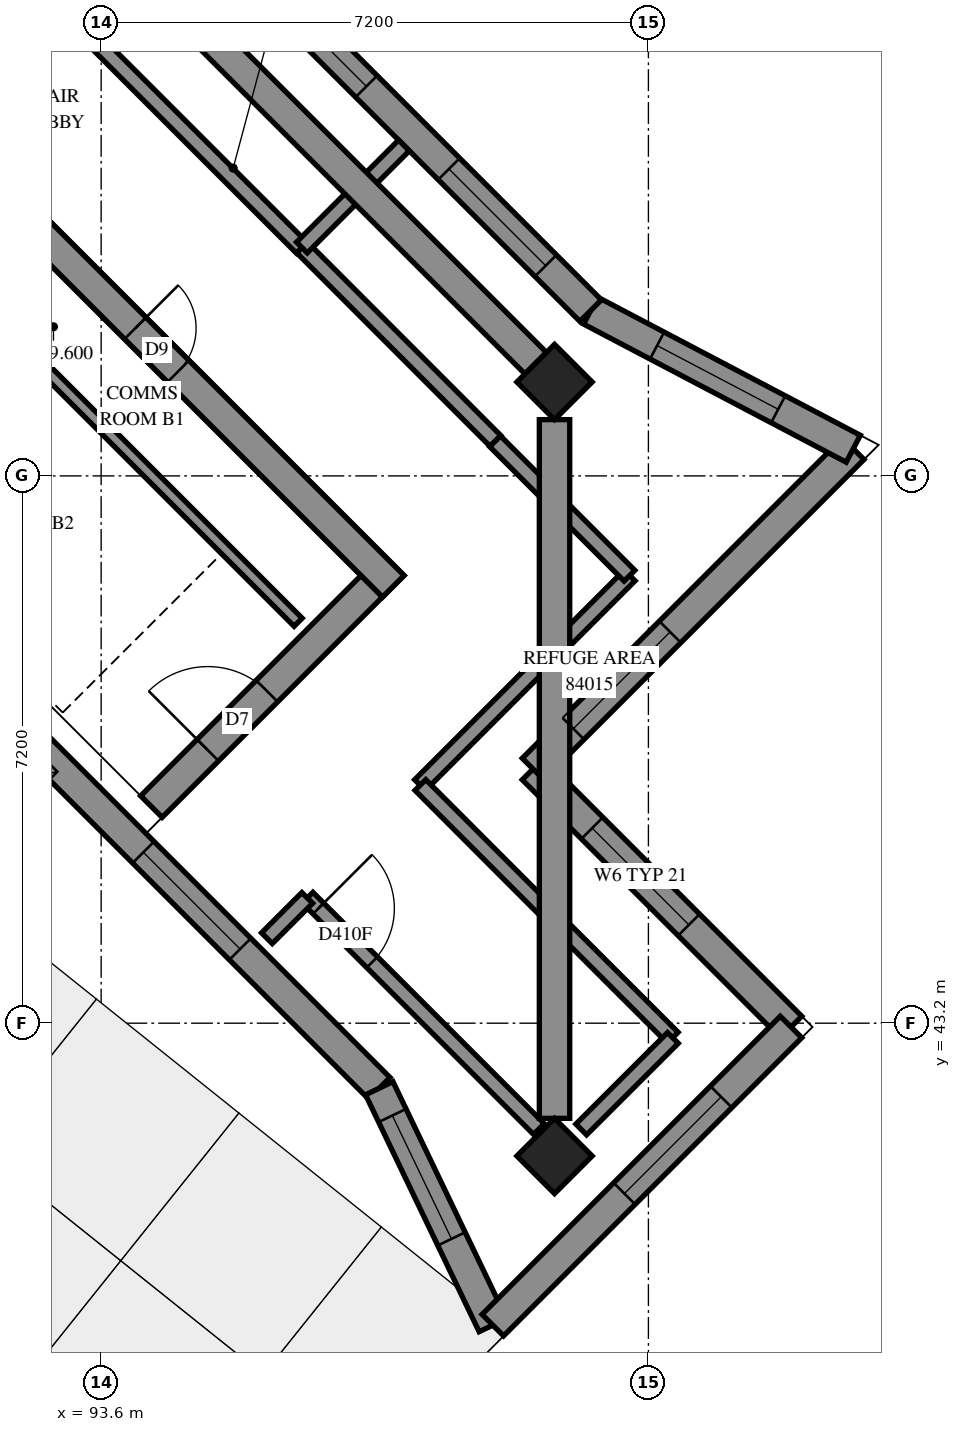
"""IFC4 building model, lengths in metres.
Left out: names, types, materials, properties, quantities, classifications, styles, units other than length and angle.
Written with IfcOpenShell. Run it as: python <this file> out.ifc"""

import sys

from ifc_helpers import new_model, si_unit, direction, frame, frame_2d, origin, origin_2d, place, context, subcontext, project, spatial, polyline, rectangle, outline, extrude, element, fill, save


model = new_model("IFC4")
c1 = context("Model", 3, precision=1e-05, world=origin(), true_north=direction((0.0, 1.0)))
c2 = subcontext(c1, "Body", "Model", "MODEL_VIEW")
j1 = project(units=[si_unit("LENGTHUNIT", "METRE"), si_unit("PLANEANGLEUNIT", "RADIAN")], contexts=[c1])
p1 = place(None, origin())
s1 = spatial("IfcSite", under=j1, at=p1, CompositionType="ELEMENT")
p2 = place(p1, origin())
s2 = spatial("IfcBuilding", under=s1, at=p2, CompositionType="ELEMENT")
p3 = place(p2, frame((0.0, 0.0, 309.6)))
s3 = spatial("IfcBuildingStorey", under=s2, at=p3, CompositionType="ELEMENT", Elevation=309.6)
for number, where, z_axis, x_axis in (
    (1, (99.565, 51.635, 0.0), (0.0, 0.0, 1.0), (0.707, -0.707, 0.0)),
    (2, (99.565, 41.453, 0.0), (0.0, 0.0, 1.0), (0.707, -0.707, 0.0)),
):
    element("IfcColumn", number, at=place(p3, frame(where, z_axis=z_axis, x_axis=x_axis)), inside=s3, PredefinedType="COLUMN", context=c2, shape_type="SweptSolid", body=[
        extrude(rectangle(XDim=0.7, YDim=0.7, at=origin_2d()), origin(), (0.0, 0.0, 1.0), 3.5),
    ])
p4 = place(p3, frame((86.695, 59.696, -0.3), z_axis=(0.0, 0.0, 1.0), x_axis=(0.7071100706, -0.7071034917, 0.0)))
e3 = element("IfcWall", 3, at=p4, inside=s3, PredefinedType="SHEAR", context=c2, shape_type="SweptSolid", body=[
    extrude(outline(polyline([(0.0, 0.0), (15.2, 0.0), (15.2, 3.1), (0.0, 3.1), (0.0, 0.0)])), frame((0.0, 0.2, 0.0), z_axis=(0.0, -1.0, 0.0), x_axis=(1.0, 0.0, 0.0)), (0.0, 0.0, 1.0), 0.4),
])
p5 = place(p4, frame((10.4, 0.0, 0.3)))
e4 = element("IfcOpeningElement", 4, at=p5, cuts=e3, PredefinedType="OPENING", context=c2, shape_type="SweptSolid", body=[
    extrude(rectangle(XDim=0.8, YDim=2.1, at=frame_2d((0.4, 1.05))), frame((0.0, 0.21, 0.0), z_axis=(0.0, -1.0, 0.0), x_axis=(1.0, 0.0, 0.0)), (0.0, 0.0, 1.0), 0.42),
])
p6 = place(p3, frame((94.261, 46.049, -0.3), z_axis=(0.0, 0.0, 1.0), x_axis=(0.7071067812, 0.7071067812, 0.0)))
e5 = element("IfcWall", 5, at=p6, inside=s3, PredefinedType="SHEAR", context=c2, shape_type="SweptSolid", body=[
    extrude(outline(polyline([(0.0, 0.0), (4.1, 0.0), (4.1, 3.1), (0.0, 3.1), (0.0, 0.0)])), frame((0.0, 0.2, 0.0), z_axis=(0.0, -1.0, 0.0), x_axis=(1.0, 0.0, 0.0)), (0.0, 0.0, 1.0), 0.4),
])
p7 = place(p6, frame((1.05, 0.0, 0.3)))
e6 = element("IfcOpeningElement", 6, at=p7, cuts=e5, PredefinedType="OPENING", context=c2, shape_type="SweptSolid", body=[
    extrude(rectangle(XDim=1.1, YDim=2.1, at=frame_2d((0.55, 1.05))), frame((0.0, 0.21, 0.0), z_axis=(0.0, -1.0, 0.0), x_axis=(1.0, 0.0, 0.0)), (0.0, 0.0, 1.0), 0.42),
])
p8 = place(p3, frame((102.676, 43.15, 0.0), z_axis=(0.0, 0.0, 1.0), x_axis=(-0.7070963646, 0.7071171977, 0.0)))
e7 = element("IfcWall", 7, at=p8, inside=s3, PredefinedType="SOLIDWALL", context=c2, shape_type="SweptSolid", body=[
    extrude(outline(polyline([(-0.2, -0.2), (4.6, -0.2), (5.0, 0.2), (0.2, 0.2), (-0.2, -0.2)])), origin(), (0.0, 0.0, 1.0), 3.5),
])
p9 = place(p8, frame((1.9, 0.0, 0.7)))
e8 = element("IfcOpeningElement", 8, at=p9, cuts=e7, PredefinedType="OPENING", context=c2, shape_type="SweptSolid", body=[
    extrude(rectangle(XDim=1.8, YDim=2.2, at=frame_2d((0.9, 1.1))), frame((0.0, 0.21, 0.0), z_axis=(0.0, -1.0, 0.0), x_axis=(1.0, 0.0, 0.0)), (0.0, 0.0, 1.0), 0.42),
])
p10 = place(p3, frame((99.282, 46.544, 0.0), z_axis=(0.0, 0.0, 1.0), x_axis=(0.7071067812, 0.7071067812, 0.0)))
e9 = element("IfcWall", 9, at=p10, inside=s3, PredefinedType="SOLIDWALL", context=c2, shape_type="SweptSolid", body=[
    extrude(outline(polyline([(0.2, -0.2), (6.23, -0.2), (5.687, 0.2), (-0.2, 0.2), (0.2, -0.2)])), origin(), (0.0, 0.0, 1.0), 3.5),
])
p11 = place(p10, frame((0.75, 0.0, 0.7)))
e10 = element("IfcOpeningElement", 10, at=p11, cuts=e9, PredefinedType="OPENING", context=c2, shape_type="SweptSolid", body=[
    extrude(rectangle(XDim=1.8, YDim=2.2, at=frame_2d((0.9, 1.1))), frame((0.0, 0.21, 0.0), z_axis=(0.0, -1.0, 0.0), x_axis=(1.0, 0.0, 0.0)), (0.0, 0.0, 1.0), 0.42),
])
p12 = place(p3, frame((103.495, 50.757, 0.0), z_axis=(0.0, 0.0, 1.0), x_axis=(-0.8850848595, 0.4654296848, 0.0)))
e11 = element("IfcWall", 11, at=p12, inside=s3, PredefinedType="SOLIDWALL", context=c2, shape_type="SweptSolid", body=[
    extrude(outline(polyline([(-0.272, -0.2), (3.873, -0.2), (3.934, 0.2), (0.272, 0.2), (-0.272, -0.2)])), origin(), (0.0, 0.0, 1.0), 3.5),
])
p13 = place(p12, frame((1.116, 0.0, 0.7)))
e12 = element("IfcOpeningElement", 12, at=p13, cuts=e11, PredefinedType="OPENING", context=c2, shape_type="SweptSolid", body=[
    extrude(rectangle(XDim=1.8, YDim=2.2, at=frame_2d((0.9, 1.1))), frame((0.0, 0.21, 0.0), z_axis=(0.0, -1.0, 0.0), x_axis=(1.0, 0.0, 0.0)), (0.0, 0.0, 1.0), 0.42),
])
p14 = place(p3, frame((100.04, 52.574, 0.0), z_axis=(0.0, 0.0, 1.0), x_axis=(-0.7071004896, 0.7071130728, 0.0)))
e13 = element("IfcWall", 13, at=p14, inside=s3, PredefinedType="SOLIDWALL", context=c2, shape_type="SweptSolid", body=[
    extrude(outline(polyline([(0.03, -0.2), (7.947, -0.2), (7.947, 0.2), (-0.03, 0.2), (0.03, -0.2)])), origin(), (0.0, 0.0, 1.0), 3.5),
])
p15 = place(p14, frame((0.836, 0.0, 0.7)))
e14 = element("IfcOpeningElement", 14, at=p15, cuts=e13, PredefinedType="OPENING", context=c2, shape_type="SweptSolid", body=[
    extrude(rectangle(XDim=1.8, YDim=2.2, at=frame_2d((0.9, 1.1))), frame((0.0, 0.21, 0.0), z_axis=(0.0, -1.0, 0.0), x_axis=(1.0, 0.0, 0.0)), (0.0, 0.0, 1.0), 0.42),
])
p16 = place(p14, frame((4.172, 0.0, 0.7)))
e15 = element("IfcOpeningElement", 15, at=p16, cuts=e13, PredefinedType="OPENING", context=c2, shape_type="SweptSolid", body=[
    extrude(rectangle(XDim=1.8, YDim=2.2, at=frame_2d((0.9, 1.1))), frame((0.0, 0.21, 0.0), z_axis=(0.0, -1.0, 0.0), x_axis=(1.0, 0.0, 0.0)), (0.0, 0.0, 1.0), 0.42),
])
p17 = place(p3, frame((92.292, 47.312, 0.0), z_axis=(0.0, 0.0, 1.0), x_axis=(0.707099663, -0.7071138993, 0.0)))
e16 = element("IfcWall", 16, at=p17, inside=s3, PredefinedType="SOLIDWALL", context=c2, shape_type="SweptSolid", body=[
    extrude(outline(polyline([(0.0, -0.2), (6.99, -0.2), (7.059, 0.2), (0.0, 0.2), (0.0, -0.2)])), origin(), (0.0, 0.0, 1.0), 3.5),
])
p18 = place(p17, frame((2.635, 0.0, 0.7)))
e17 = element("IfcOpeningElement", 17, at=p18, cuts=e16, PredefinedType="OPENING", context=c2, shape_type="SweptSolid", body=[
    extrude(rectangle(XDim=1.8, YDim=2.2, at=frame_2d((0.9, 1.1))), frame((0.0, 0.21, 0.0), z_axis=(0.0, -1.0, 0.0), x_axis=(1.0, 0.0, 0.0)), (0.0, 0.0, 1.0), 0.42),
])
p19 = place(p3, frame((97.259, 42.344, 0.0), z_axis=(0.0, 0.0, 1.0), x_axis=(0.432271135, -0.9017436808, 0.0)))
e18 = element("IfcWall", 18, at=p19, inside=s3, PredefinedType="SOLIDWALL", context=c2, shape_type="SweptSolid", body=[
    extrude(outline(polyline([(0.034, -0.2), (3.739, -0.2), (3.175, 0.2), (-0.034, 0.2), (0.034, -0.2)])), origin(), (0.0, 0.0, 1.0), 3.5),
])
p20 = place(p19, frame((0.398, 0.0, 0.7)))
e19 = element("IfcOpeningElement", 19, at=p20, cuts=e18, PredefinedType="OPENING", context=c2, shape_type="SweptSolid", body=[
    extrude(rectangle(XDim=1.8, YDim=2.2, at=frame_2d((0.9, 1.1))), frame((0.0, 0.21, 0.0), z_axis=(0.0, -1.0, 0.0), x_axis=(1.0, 0.0, 0.0)), (0.0, 0.0, 1.0), 0.42),
])
p21 = place(p3, frame((98.753, 39.227, 0.0), z_axis=(0.0, 0.0, 1.0), x_axis=(0.707115794, 0.7070977682, 0.0)))
e20 = element("IfcWall", 20, at=p21, inside=s3, PredefinedType="SOLIDWALL", context=c2, shape_type="SweptSolid", body=[
    extrude(outline(polyline([(-0.282, -0.2), (5.748, -0.2), (5.348, 0.2), (0.282, 0.2), (-0.282, -0.2)])), origin(), (0.0, 0.0, 1.0), 3.5),
])
p22 = place(p21, frame((2.448, 0.0, 0.7)))
e21 = element("IfcOpeningElement", 21, at=p22, cuts=e20, PredefinedType="OPENING", context=c2, shape_type="SweptSolid", body=[
    extrude(rectangle(XDim=1.8, YDim=2.2, at=frame_2d((0.9, 1.1))), frame((0.0, 0.21, 0.0), z_axis=(0.0, -1.0, 0.0), x_axis=(1.0, 0.0, 0.0)), (0.0, 0.0, 1.0), 0.42),
])
p23 = place(p3, frame((91.313, 53.354, 0.0), z_axis=(0.0, 0.0, 1.0), x_axis=(0.7071140275, -0.7070995348, 0.0)))
e22 = element("IfcWall", 22, at=p23, inside=s3, PredefinedType="PARTITIONING", context=c2, shape_type="SweptSolid", body=[
    extrude(outline(polyline([(0.0, 0.0), (6.9, 0.0), (6.9, 3.5), (0.0, 3.5), (0.0, 0.0)])), frame((0.0, 0.075, 0.0), z_axis=(0.0, -1.0, 0.0), x_axis=(1.0, 0.0, 0.0)), (0.0, 0.0, 1.0), 0.15),
])
p24 = place(p3, frame((86.835, 62.803, 0.0), z_axis=(0.0, 0.0, 1.0), x_axis=(0.7072045346, -0.7070090143, 0.0)))
e23 = element("IfcWall", 23, at=p24, inside=s3, PredefinedType="PARTITIONING", context=c2, shape_type="SweptSolid", body=[
    extrude(rectangle(XDim=13.298, YDim=0.2, at=frame_2d((6.649, 0.0))), origin(), (0.0, 0.0, 1.0), 3.5),
])
p25 = place(p24, frame((8.169, 0.0, 0.0)))
e24 = element("IfcOpeningElement", 24, at=p25, cuts=e23, PredefinedType="OPENING", context=c2, shape_type="SweptSolid", body=[
    extrude(rectangle(XDim=1.0, YDim=2.1, at=frame_2d((0.5, 1.05))), frame((0.0, 0.11, 0.0), z_axis=(0.0, -1.0, 0.0), x_axis=(1.0, 0.0, 0.0)), (0.0, 0.0, 1.0), 0.22),
])
p26 = place(p3, frame((96.315, 44.851, 0.0), z_axis=(0.0, 0.0, 1.0), x_axis=(0.7071067812, -0.7071067812, 0.0)))
e25 = element("IfcWall", 25, at=p26, inside=s3, PredefinedType="PARTITIONING", context=c2, shape_type="SweptSolid", body=[
    extrude(rectangle(XDim=4.305, YDim=0.2, at=frame_2d((2.152, 0.0))), origin(), (0.0, 0.0, 1.0), 3.5),
])
p27 = place(p26, frame((0.201, 0.0, 0.0)))
e26 = element("IfcOpeningElement", 26, at=p27, cuts=e25, PredefinedType="OPENING", context=c2, shape_type="SweptSolid", body=[
    extrude(rectangle(XDim=1.0, YDim=2.1, at=frame_2d((0.5, 1.05))), frame((0.0, 0.11, 0.0), z_axis=(0.0, -1.0, 0.0), x_axis=(1.0, 0.0, 0.0)), (0.0, 0.0, 1.0), 0.22),
])
p28 = place(p3, frame((97.796, 46.332, 0.0), z_axis=(0.0, 0.0, 1.0), x_axis=(0.7071067812, 0.7071067812, 0.0)))
e27 = element("IfcWall", 27, at=p28, inside=s3, PredefinedType="PARTITIONING", context=c2, shape_type="SweptSolid", body=[
    extrude(rectangle(XDim=3.9, YDim=0.2, at=frame_2d((1.95, 0.0))), origin(), (0.0, 0.0, 1.0), 3.5),
])
p29 = place(p3, frame((96.244, 53.406, 0.0), z_axis=(0.0, 0.0, 1.0), x_axis=(0.7068288851, -0.7073845681, 0.0)))
e28 = element("IfcWall", 28, at=p29, inside=s3, PredefinedType="PARTITIONING", context=c2, shape_type="SweptSolid", body=[
    extrude(rectangle(XDim=3.599, YDim=0.2, at=frame_2d((1.8, 0.0))), origin(), (0.0, 0.0, 1.0), 3.5),
])
p30 = place(p3, frame((98.783, 50.855, 0.0), z_axis=(0.0, 0.0, 1.0), x_axis=(0.7071067812, -0.7071067812, 0.0)))
e29 = element("IfcWall", 29, at=p30, inside=s3, PredefinedType="PARTITIONING", context=c2, shape_type="SweptSolid", body=[
    extrude(rectangle(XDim=2.5, YDim=0.2, at=frame_2d((1.25, 0.0))), origin(), (0.0, 0.0, 1.0), 3.5),
])
for number, where, z_axis, x_axis in (
    (30, (99.458, 44.67, 0.0), (0.0, 0.0, 1.0), (0.708, -0.707, 0.0)),
    (31, (97.8, 46.334, 0.0), (0.0, 0.0, 1.0), (0.707, -0.708, 0.0)),
):
    element("IfcWall", number, at=place(p3, frame(where, z_axis=z_axis, x_axis=x_axis)), inside=s3, PredefinedType="PARTITIONING", context=c2, shape_type="SweptSolid", body=[
        extrude(rectangle(XDim=2.349, YDim=0.2, at=frame_2d((1.175, 0.0))), origin(), (0.0, 0.0, 1.0), 3.5),
    ])
p31 = place(p3, frame((99.916, 41.802, 0.0), z_axis=(0.0, 0.0, 1.0), x_axis=(0.7076933481, 0.7065197273, 0.0)))
e32 = element("IfcWall", 32, at=p31, inside=s3, PredefinedType="PARTITIONING", context=c2, shape_type="SweptSolid", body=[
    extrude(rectangle(XDim=1.704, YDim=0.2, at=frame_2d((0.852, 0.0))), origin(), (0.0, 0.0, 1.0), 3.5),
])
p32 = place(p3, frame((95.781, 44.318, 0.0), z_axis=(0.0, 0.0, 1.0), x_axis=(0.7071067812, 0.7071067812, 0.0)))
e33 = element("IfcWall", 33, at=p32, inside=s3, PredefinedType="PARTITIONING", context=c2, shape_type="SweptSolid", body=[
    extrude(rectangle(XDim=0.751, YDim=0.2, at=frame_2d((0.375, 0.0))), origin(), (0.0, 0.0, 1.0), 3.5),
])
p33 = place(p3, frame((96.241, 53.405, 0.0), z_axis=(0.0, 0.0, 1.0), x_axis=(0.7071067812, 0.7071067812, 0.0)))
e34 = element("IfcWall", 34, at=p33, inside=s3, PredefinedType="PARTITIONING", context=c2, shape_type="SweptSolid", body=[
    extrude(outline(polyline([(0.0, -0.1), (1.899, -0.1), (1.899, 0.1), (0.0, 0.1), (0.0, -0.1)])), origin(), (0.0, 0.0, 1.0), 3.5),
])
p34 = place(p9, origin())
e35 = element("IfcWindow", 35, at=p34, inside=s3, PartitioningType="SINGLE_PANEL", PredefinedType="WINDOW", context=c2, shape_type="SweptSolid", body=[
    extrude(rectangle(XDim=1.8, YDim=2.2, at=frame_2d((0.9, 1.1))), frame((0.0, 0.08, 0.0), z_axis=(0.0, -1.0, 0.0), x_axis=(1.0, 0.0, 0.0)), (0.0, 0.0, 1.0), 0.06),
])
fill(e8, e35)
p35 = place(p11, origin())
e36 = element("IfcWindow", 36, at=p35, inside=s3, PartitioningType="SINGLE_PANEL", PredefinedType="WINDOW", context=c2, shape_type="SweptSolid", body=[
    extrude(rectangle(XDim=1.8, YDim=2.2, at=frame_2d((0.9, 1.1))), frame((0.0, 0.08, 0.0), z_axis=(0.0, -1.0, 0.0), x_axis=(1.0, 0.0, 0.0)), (0.0, 0.0, 1.0), 0.06),
])
fill(e10, e36)
p36 = place(p13, origin())
e37 = element("IfcWindow", 37, at=p36, inside=s3, PartitioningType="SINGLE_PANEL", PredefinedType="WINDOW", context=c2, shape_type="SweptSolid", body=[
    extrude(rectangle(XDim=1.8, YDim=2.2, at=frame_2d((0.9, 1.1))), frame((0.0, 0.08, 0.0), z_axis=(0.0, -1.0, 0.0), x_axis=(1.0, 0.0, 0.0)), (0.0, 0.0, 1.0), 0.06),
])
fill(e12, e37)
p37 = place(p15, origin())
e38 = element("IfcWindow", 38, at=p37, inside=s3, PartitioningType="SINGLE_PANEL", PredefinedType="WINDOW", context=c2, shape_type="SweptSolid", body=[
    extrude(rectangle(XDim=1.8, YDim=2.2, at=frame_2d((0.9, 1.1))), frame((0.0, 0.08, 0.0), z_axis=(0.0, -1.0, 0.0), x_axis=(1.0, 0.0, 0.0)), (0.0, 0.0, 1.0), 0.06),
])
fill(e14, e38)
p38 = place(p16, origin())
e39 = element("IfcWindow", 39, at=p38, inside=s3, PartitioningType="SINGLE_PANEL", PredefinedType="WINDOW", context=c2, shape_type="SweptSolid", body=[
    extrude(rectangle(XDim=1.8, YDim=2.2, at=frame_2d((0.9, 1.1))), frame((0.0, 0.08, 0.0), z_axis=(0.0, -1.0, 0.0), x_axis=(1.0, 0.0, 0.0)), (0.0, 0.0, 1.0), 0.06),
])
fill(e15, e39)
p39 = place(p18, origin())
e40 = element("IfcWindow", 40, at=p39, inside=s3, PartitioningType="SINGLE_PANEL", PredefinedType="WINDOW", context=c2, shape_type="SweptSolid", body=[
    extrude(rectangle(XDim=1.8, YDim=2.2, at=frame_2d((0.9, 1.1))), frame((0.0, 0.08, 0.0), z_axis=(0.0, -1.0, 0.0), x_axis=(1.0, 0.0, 0.0)), (0.0, 0.0, 1.0), 0.06),
])
fill(e17, e40)
p40 = place(p20, origin())
e41 = element("IfcWindow", 41, at=p40, inside=s3, PartitioningType="SINGLE_PANEL", PredefinedType="WINDOW", context=c2, shape_type="SweptSolid", body=[
    extrude(rectangle(XDim=1.8, YDim=2.2, at=frame_2d((0.9, 1.1))), frame((0.0, 0.08, 0.0), z_axis=(0.0, -1.0, 0.0), x_axis=(1.0, 0.0, 0.0)), (0.0, 0.0, 1.0), 0.06),
])
fill(e19, e41)
p41 = place(p22, origin())
e42 = element("IfcWindow", 42, at=p41, inside=s3, PartitioningType="SINGLE_PANEL", PredefinedType="WINDOW", context=c2, shape_type="SweptSolid", body=[
    extrude(rectangle(XDim=1.8, YDim=2.2, at=frame_2d((0.9, 1.1))), frame((0.0, 0.08, 0.0), z_axis=(0.0, -1.0, 0.0), x_axis=(1.0, 0.0, 0.0)), (0.0, 0.0, 1.0), 0.06),
])
fill(e21, e42)
p42 = place(p5, origin())
e43 = element("IfcDoor", 43, at=p42, inside=s3, OperationType="SINGLE_SWING_RIGHT", PredefinedType="DOOR", context=c2, shape_type="SweptSolid", body=[
    extrude(rectangle(XDim=0.8, YDim=2.1, at=frame_2d((0.4, 1.05))), frame((0.0, 0.025, 0.0), z_axis=(0.0, -1.0, 0.0), x_axis=(1.0, 0.0, 0.0)), (0.0, 0.0, 1.0), 0.05),
])
fill(e4, e43)
p43 = place(p7, origin())
e44 = element("IfcDoor", 44, at=p43, inside=s3, OperationType="SINGLE_SWING_RIGHT", PredefinedType="DOOR", context=c2, shape_type="SweptSolid", body=[
    extrude(rectangle(XDim=1.1, YDim=2.1, at=frame_2d((0.55, 1.05))), frame((0.0, 0.025, 0.0), z_axis=(0.0, -1.0, 0.0), x_axis=(1.0, 0.0, 0.0)), (0.0, 0.0, 1.0), 0.05),
])
fill(e6, e44)
p44 = place(p27, origin())
e45 = element("IfcDoor", 45, at=p44, inside=s3, OperationType="SINGLE_SWING_RIGHT", PredefinedType="DOOR", context=c2, shape_type="SweptSolid", body=[
    extrude(rectangle(XDim=1.0, YDim=2.1, at=frame_2d((0.5, 1.05))), frame((0.0, 0.025, 0.0), z_axis=(0.0, -1.0, 0.0), x_axis=(1.0, 0.0, 0.0)), (0.0, 0.0, 1.0), 0.05),
])
fill(e26, e45)
save(model, sys.argv[1])
